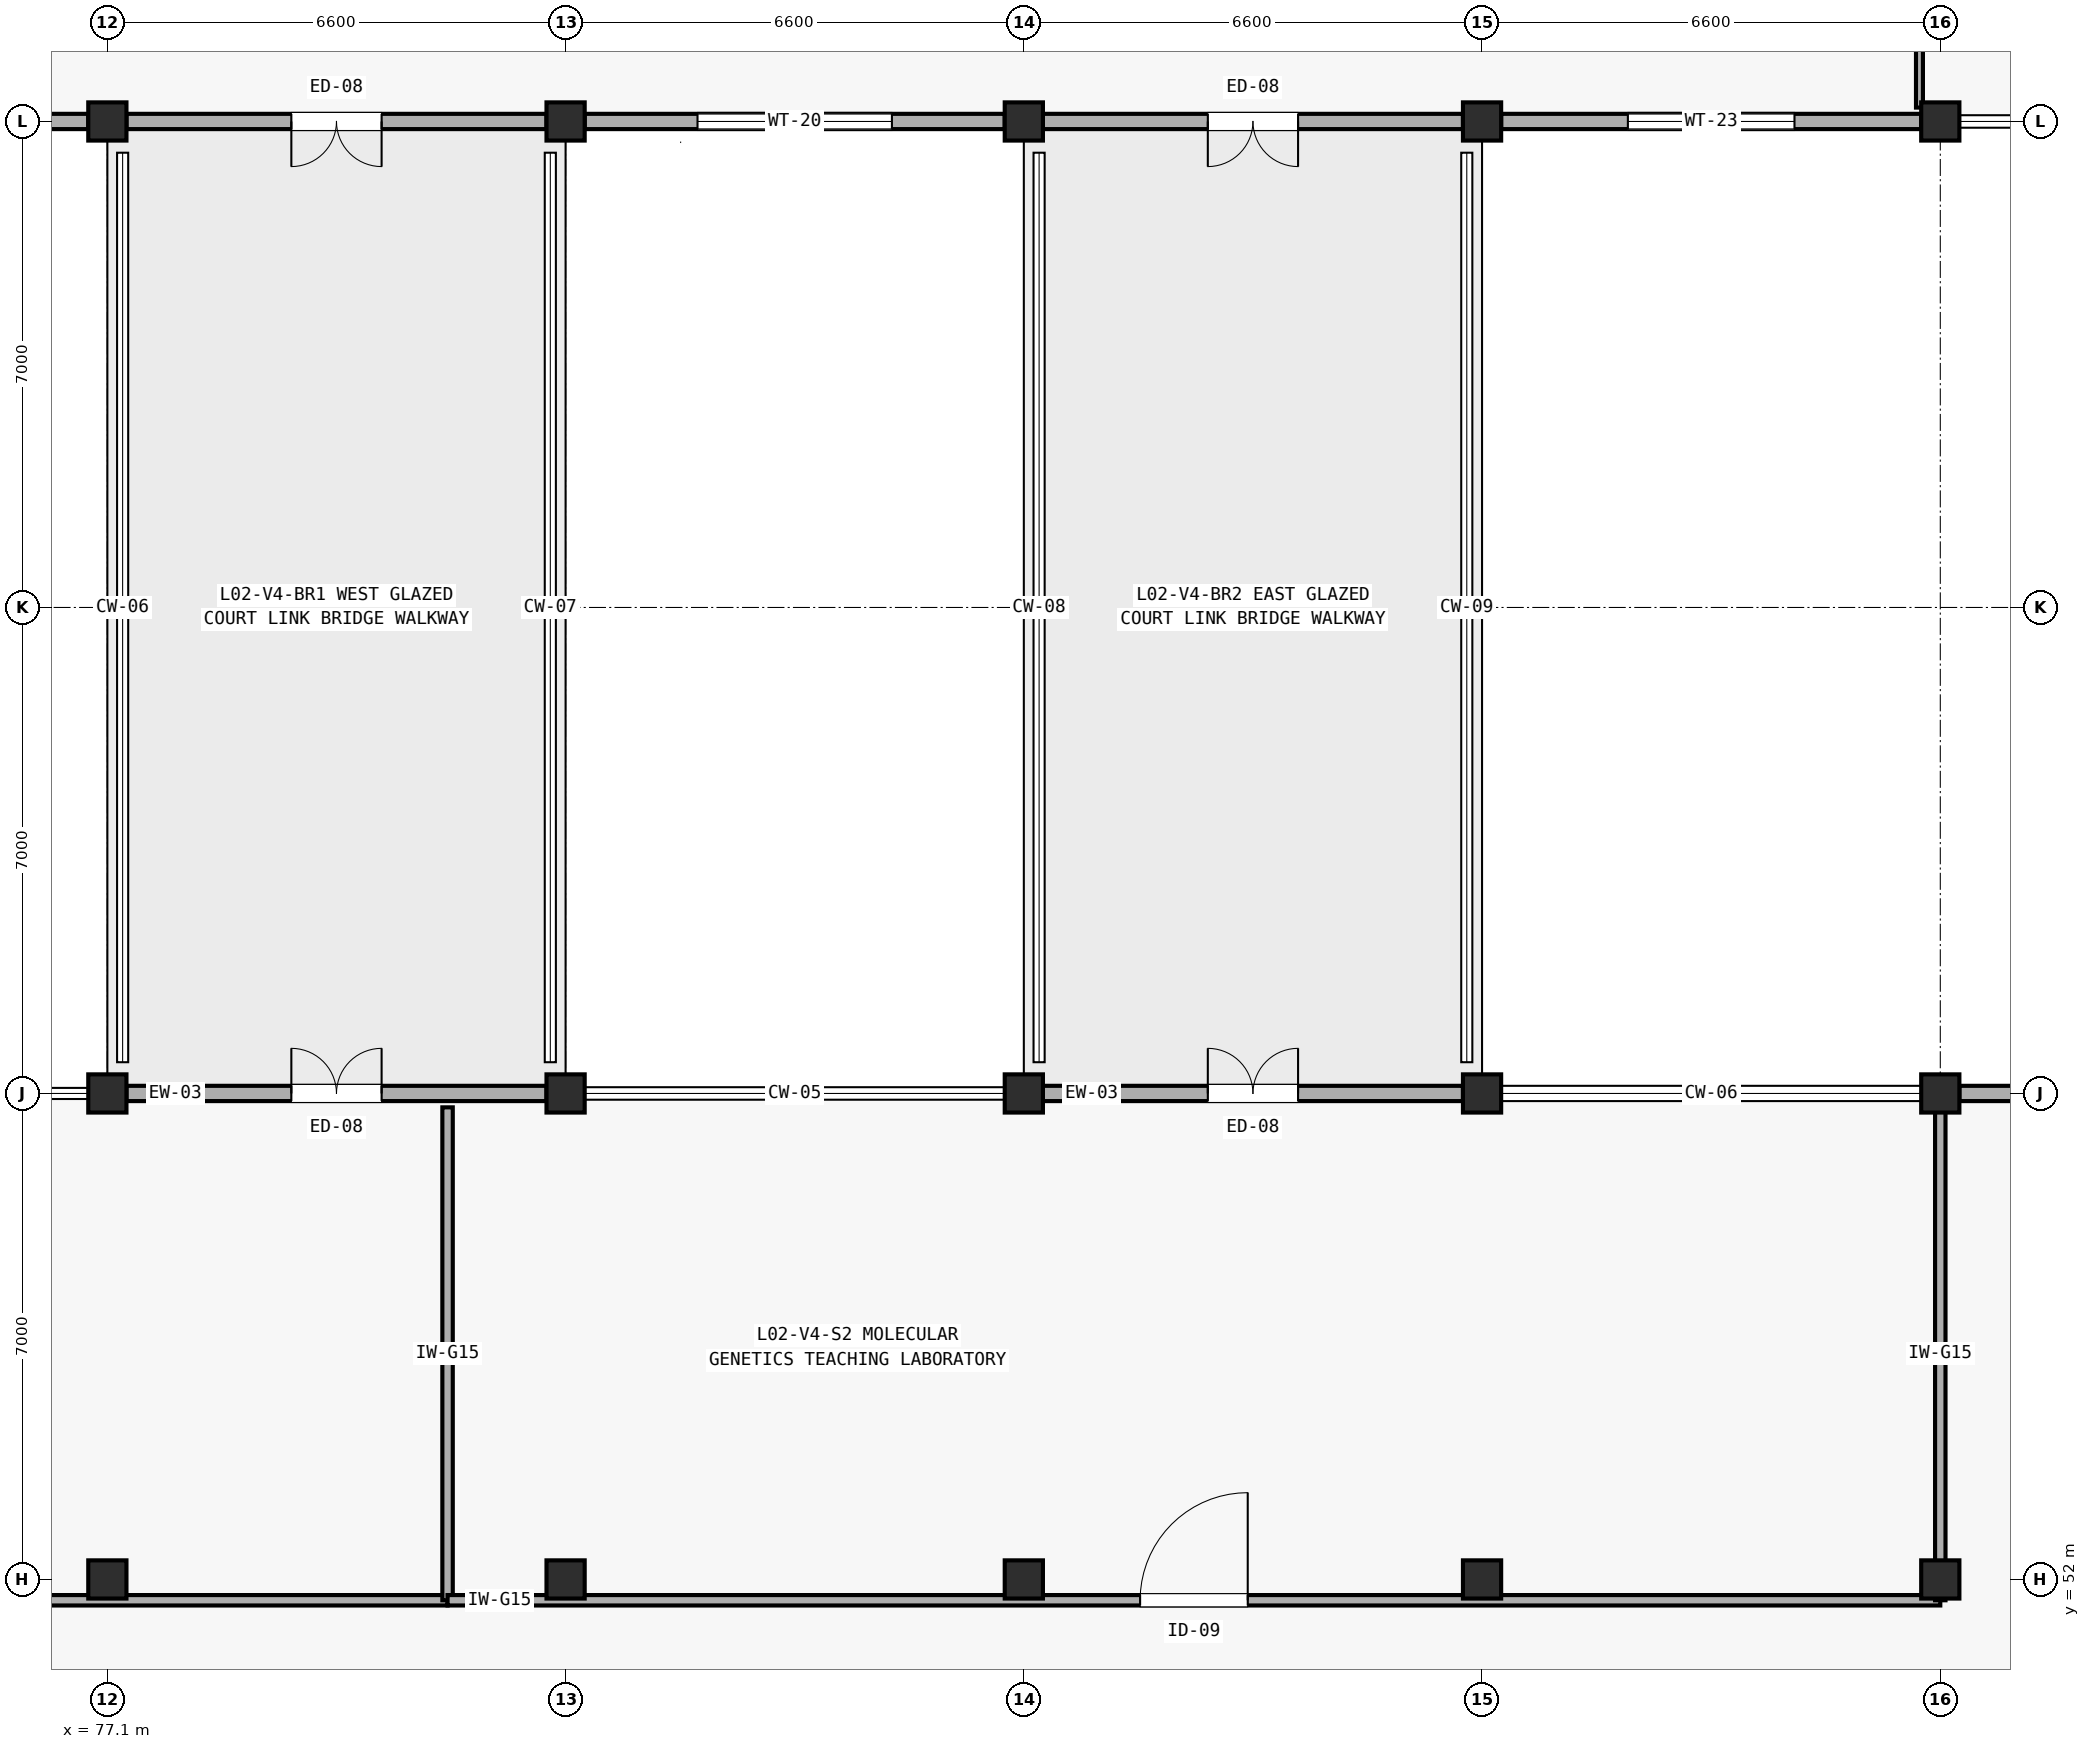
"""IFC4 building model, lengths in metres.
Left out: names, types, materials, properties, quantities, classifications, styles, units other than length and angle.
Written with IfcOpenShell. Run it as: python <this file> out.ifc"""

import sys

from ifc_helpers import new_model, si_unit, direction, frame, frame_2d, origin, origin_2d, place, context, subcontext, project, spatial, rectangle, extrude, element, fill, save


model = new_model("IFC4")
c1 = context("Model", 3, precision=1e-05, world=origin(), true_north=direction((0.0, 1.0)))
c2 = subcontext(c1, "Body", "Model", "MODEL_VIEW")
j1 = project(units=[si_unit("LENGTHUNIT", "METRE"), si_unit("PLANEANGLEUNIT", "RADIAN")], contexts=[c1])
p1 = place(None, origin())
s1 = spatial("IfcSite", under=j1, at=p1, CompositionType="ELEMENT")
p2 = place(p1, origin())
s2 = spatial("IfcBuilding", under=s1, at=p2, CompositionType="ELEMENT")
p3 = place(p2, frame((0.0, 0.0, 8.4)))
s3 = spatial("IfcBuildingStorey", under=s2, at=p3, CompositionType="ELEMENT", Elevation=8.4)
for number, where, z_axis, x_axis in (
    (1, (77.1, 52.0, 0.0), (0.0, 0.0, 1.0), (1.0, 0.0, 0.0)),
    (2, (77.1, 59.0, 0.0), (0.0, 0.0, 1.0), (1.0, 0.0, 0.0)),
    (3, (77.1, 73.0, 0.0), (0.0, 0.0, 1.0), (1.0, 0.0, 0.0)),
    (4, (83.7, 52.0, 0.0), (0.0, 0.0, 1.0), (1.0, 0.0, 0.0)),
    (5, (83.7, 59.0, 0.0), (0.0, 0.0, 1.0), (1.0, 0.0, 0.0)),
    (6, (83.7, 73.0, 0.0), (0.0, 0.0, 1.0), (1.0, 0.0, 0.0)),
    (7, (90.3, 52.0, 0.0), (0.0, 0.0, 1.0), (1.0, 0.0, 0.0)),
    (8, (90.3, 59.0, 0.0), (0.0, 0.0, 1.0), (1.0, 0.0, 0.0)),
    (9, (90.3, 73.0, 0.0), (0.0, 0.0, 1.0), (1.0, 0.0, 0.0)),
    (10, (96.9, 52.0, 0.0), (0.0, 0.0, 1.0), (1.0, 0.0, 0.0)),
    (11, (96.9, 59.0, 0.0), (0.0, 0.0, 1.0), (1.0, 0.0, 0.0)),
    (12, (96.9, 73.0, 0.0), (0.0, 0.0, 1.0), (1.0, 0.0, 0.0)),
    (13, (103.5, 52.0, 0.0), (0.0, 0.0, 1.0), (1.0, 0.0, 0.0)),
    (14, (103.5, 59.0, 0.0), (0.0, 0.0, 1.0), (1.0, 0.0, 0.0)),
    (15, (103.5, 73.0, 0.0), (0.0, 0.0, 1.0), (1.0, 0.0, 0.0)),
):
    element("IfcColumn", number, at=place(p3, frame(where, z_axis=z_axis, x_axis=x_axis)), inside=s3, PredefinedType="COLUMN", context=c2, shape_type="SweptSolid", body=[
        extrude(rectangle(XDim=0.55, YDim=0.55, at=origin_2d()), origin(), (0.0, 0.0, 1.0), 4.2),
    ])
p4 = place(p3, frame((77.375, 59.0, 0.0), z_axis=(0.0, 0.0, 1.0), x_axis=(1.0, 0.0, 0.0)))
e16 = element("IfcWall", 16, at=p4, inside=s3, PredefinedType="SOLIDWALL", context=c2, shape_type="SweptSolid", body=[
    extrude(rectangle(XDim=6.05, YDim=0.22, at=frame_2d((3.025, 0.0))), origin(), (0.0, 0.0, 1.0), 3.285),
])
p5 = place(p4, frame((2.375, 0.0, 0.0)))
e17 = element("IfcOpeningElement", 17, at=p5, cuts=e16, PredefinedType="OPENING", context=c2, shape_type="SweptSolid", body=[
    extrude(rectangle(XDim=1.3, YDim=2.15, at=frame_2d((0.65, 1.075))), frame((0.0, 0.12, 0.0), z_axis=(0.0, -1.0, 0.0), x_axis=(1.0, 0.0, 0.0)), (0.0, 0.0, 1.0), 0.24),
])
p6 = place(p3, frame((90.575, 59.0, 0.0), z_axis=(0.0, 0.0, 1.0), x_axis=(1.0, 0.0, 0.0)))
e18 = element("IfcWall", 18, at=p6, inside=s3, PredefinedType="SOLIDWALL", context=c2, shape_type="SweptSolid", body=[
    extrude(rectangle(XDim=6.05, YDim=0.22, at=frame_2d((3.025, 0.0))), origin(), (0.0, 0.0, 1.0), 3.365),
])
p7 = place(p6, frame((2.375, 0.0, 0.0)))
e19 = element("IfcOpeningElement", 19, at=p7, cuts=e18, PredefinedType="OPENING", context=c2, shape_type="SweptSolid", body=[
    extrude(rectangle(XDim=1.3, YDim=2.15, at=frame_2d((0.65, 1.075))), frame((0.0, 0.12, 0.0), z_axis=(0.0, -1.0, 0.0), x_axis=(1.0, 0.0, 0.0)), (0.0, 0.0, 1.0), 0.24),
])
p8 = place(p3, frame((103.775, 59.0, 0.0), z_axis=(0.0, 0.0, 1.0), x_axis=(1.0, 0.0, 0.0)))
e20 = element("IfcWall", 20, at=p8, inside=s3, PredefinedType="SOLIDWALL", context=c2, shape_type="SweptSolid", body=[
    extrude(rectangle(XDim=6.05, YDim=0.22, at=frame_2d((3.025, 0.0))), origin(), (0.0, 0.0, 1.0), 3.345),
])
p9 = place(p8, frame((1.525, 0.0, 0.85)))
e21 = element("IfcOpeningElement", 21, at=p9, cuts=e20, PredefinedType="OPENING", context=c2, shape_type="SweptSolid", body=[
    extrude(rectangle(XDim=3.0, YDim=1.5, at=frame_2d((1.5, 0.75))), frame((0.0, 0.12, 0.0), z_axis=(0.0, -1.0, 0.0), x_axis=(1.0, 0.0, 0.0)), (0.0, 0.0, 1.0), 0.24),
])
p10 = place(p3, frame((70.775, 73.0, 0.0), z_axis=(0.0, 0.0, 1.0), x_axis=(1.0, 0.0, 0.0)))
e22 = element("IfcWall", 22, at=p10, inside=s3, PredefinedType="SOLIDWALL", context=c2, shape_type="SweptSolid", body=[
    extrude(rectangle(XDim=6.05, YDim=0.22, at=frame_2d((3.025, 0.0))), origin(), (0.0, 0.0, 1.0), 3.235),
])
p11 = place(p10, frame((2.075, 0.0, 0.85)))
e23 = element("IfcOpeningElement", 23, at=p11, cuts=e22, PredefinedType="OPENING", context=c2, shape_type="SweptSolid", body=[
    extrude(rectangle(XDim=1.9, YDim=1.25, at=frame_2d((0.95, 0.625))), frame((0.0, 0.12, 0.0), z_axis=(0.0, -1.0, 0.0), x_axis=(1.0, 0.0, 0.0)), (0.0, 0.0, 1.0), 0.24),
])
p12 = place(p3, frame((77.375, 73.0, 0.0), z_axis=(0.0, 0.0, 1.0), x_axis=(1.0, 0.0, 0.0)))
e24 = element("IfcWall", 24, at=p12, inside=s3, PredefinedType="SOLIDWALL", context=c2, shape_type="SweptSolid", body=[
    extrude(rectangle(XDim=6.05, YDim=0.22, at=frame_2d((3.025, 0.0))), origin(), (0.0, 0.0, 1.0), 3.285),
])
p13 = place(p12, frame((2.375, 0.0, 0.0)))
e25 = element("IfcOpeningElement", 25, at=p13, cuts=e24, PredefinedType="OPENING", context=c2, shape_type="SweptSolid", body=[
    extrude(rectangle(XDim=1.3, YDim=2.15, at=frame_2d((0.65, 1.075))), frame((0.0, 0.12, 0.0), z_axis=(0.0, -1.0, 0.0), x_axis=(1.0, 0.0, 0.0)), (0.0, 0.0, 1.0), 0.24),
])
p14 = place(p3, frame((83.975, 73.0, 0.0), z_axis=(0.0, 0.0, 1.0), x_axis=(1.0, 0.0, 0.0)))
e26 = element("IfcWall", 26, at=p14, inside=s3, PredefinedType="SOLIDWALL", context=c2, shape_type="SweptSolid", body=[
    extrude(rectangle(XDim=6.05, YDim=0.22, at=frame_2d((3.025, 0.0))), origin(), (0.0, 0.0, 1.0), 3.365),
])
p15 = place(p14, frame((1.625, 0.0, 0.85)))
e27 = element("IfcOpeningElement", 27, at=p15, cuts=e26, PredefinedType="OPENING", context=c2, shape_type="SweptSolid", body=[
    extrude(rectangle(XDim=2.8, YDim=1.25, at=frame_2d((1.4, 0.625))), frame((0.0, 0.12, 0.0), z_axis=(0.0, -1.0, 0.0), x_axis=(1.0, 0.0, 0.0)), (0.0, 0.0, 1.0), 0.24),
])
p16 = place(p3, frame((90.575, 73.0, 0.0), z_axis=(0.0, 0.0, 1.0), x_axis=(1.0, 0.0, 0.0)))
e28 = element("IfcWall", 28, at=p16, inside=s3, PredefinedType="SOLIDWALL", context=c2, shape_type="SweptSolid", body=[
    extrude(rectangle(XDim=6.05, YDim=0.22, at=frame_2d((3.025, 0.0))), origin(), (0.0, 0.0, 1.0), 3.365),
])
p17 = place(p16, frame((2.375, 0.0, 0.0)))
e29 = element("IfcOpeningElement", 29, at=p17, cuts=e28, PredefinedType="OPENING", context=c2, shape_type="SweptSolid", body=[
    extrude(rectangle(XDim=1.3, YDim=2.15, at=frame_2d((0.65, 1.075))), frame((0.0, 0.12, 0.0), z_axis=(0.0, -1.0, 0.0), x_axis=(1.0, 0.0, 0.0)), (0.0, 0.0, 1.0), 0.24),
])
p18 = place(p3, frame((97.175, 73.0, 0.0), z_axis=(0.0, 0.0, 1.0), x_axis=(1.0, 0.0, 0.0)))
e30 = element("IfcWall", 30, at=p18, inside=s3, PredefinedType="SOLIDWALL", context=c2, shape_type="SweptSolid", body=[
    extrude(rectangle(XDim=6.05, YDim=0.22, at=frame_2d((3.025, 0.0))), origin(), (0.0, 0.0, 1.0), 3.385),
])
p19 = place(p18, frame((1.825, 0.0, 0.85)))
e31 = element("IfcOpeningElement", 31, at=p19, cuts=e30, PredefinedType="OPENING", context=c2, shape_type="SweptSolid", body=[
    extrude(rectangle(XDim=2.4, YDim=1.6, at=frame_2d((1.2, 0.8))), frame((0.0, 0.12, 0.0), z_axis=(0.0, -1.0, 0.0), x_axis=(1.0, 0.0, 0.0)), (0.0, 0.0, 1.0), 0.24),
])
p20 = place(p3, frame((63.6, 51.7, 0.0), z_axis=(0.0, 0.0, 1.0), x_axis=(1.0, 0.0, 0.0)))
e32 = element("IfcWall", 32, at=p20, inside=s3, PredefinedType="PARTITIONING", context=c2, shape_type="SweptSolid", body=[
    extrude(rectangle(XDim=18.4, YDim=0.15, at=frame_2d((9.2, 0.0))), origin(), (0.0, 0.0, 1.0), 3.235),
])
p21 = place(p20, frame((8.475, 0.0, 0.0)))
e33 = element("IfcOpeningElement", 33, at=p21, cuts=e32, PredefinedType="OPENING", context=c2, shape_type="SweptSolid", body=[
    extrude(rectangle(XDim=1.45, YDim=2.2, at=frame_2d((0.725, 1.1))), frame((0.0, 0.085, 0.0), z_axis=(0.0, -1.0, 0.0), x_axis=(1.0, 0.0, 0.0)), (0.0, 0.0, 1.0), 0.17),
])
p22 = place(p3, frame((82.0, 51.7, 0.0), z_axis=(0.0, 0.0, 1.0), x_axis=(0.0, 1.0, 0.0)))
e34 = element("IfcWall", 34, at=p22, inside=s3, PredefinedType="PARTITIONING", context=c2, shape_type="SweptSolid", body=[
    extrude(rectangle(XDim=7.1, YDim=0.15, at=frame_2d((3.55, 0.0))), origin(), (0.0, 0.0, 1.0), 3.501),
])
p23 = place(p3, frame((82.0, 51.7, 0.0), z_axis=(0.0, 0.0, 1.0), x_axis=(1.0, 0.0, 0.0)))
e35 = element("IfcWall", 35, at=p23, inside=s3, PredefinedType="PARTITIONING", context=c2, shape_type="SweptSolid", body=[
    extrude(rectangle(XDim=21.5, YDim=0.15, at=frame_2d((10.75, 0.0))), origin(), (0.0, 0.0, 1.0), 3.285),
])
p24 = place(p23, frame((9.975, 0.0, 0.0)))
e36 = element("IfcOpeningElement", 36, at=p24, cuts=e35, PredefinedType="OPENING", context=c2, shape_type="SweptSolid", body=[
    extrude(rectangle(XDim=1.55, YDim=2.2, at=frame_2d((0.775, 1.1))), frame((0.0, 0.085, 0.0), z_axis=(0.0, -1.0, 0.0), x_axis=(1.0, 0.0, 0.0)), (0.0, 0.0, 1.0), 0.17),
])
p25 = place(p3, frame((103.5, 51.7, 0.0), z_axis=(0.0, 0.0, 1.0), x_axis=(0.0, 1.0, 0.0)))
e37 = element("IfcWall", 37, at=p25, inside=s3, PredefinedType="PARTITIONING", context=c2, shape_type="SweptSolid", body=[
    extrude(rectangle(XDim=7.1, YDim=0.15, at=frame_2d((3.55, 0.0))), origin(), (0.0, 0.0, 1.0), 3.445),
])
p26 = place(p3, frame((103.2, 73.2, 0.0), z_axis=(0.0, 0.0, 1.0), x_axis=(0.0, 1.0, 0.0)))
e38 = element("IfcWall", 38, at=p26, inside=s3, PredefinedType="PARTITIONING", context=c2, shape_type="SweptSolid", body=[
    extrude(rectangle(XDim=4.1, YDim=0.1, at=frame_2d((2.05, 0.0))), origin(), (0.0, 0.0, 1.0), 3.545),
])
p27 = place(p5, origin())
e39 = element("IfcDoor", 39, at=p27, inside=s3, OperationType="DOUBLE_DOOR_SINGLE_SWING", PredefinedType="DOOR", context=c2, shape_type="SweptSolid", body=[
    extrude(rectangle(XDim=1.3, YDim=2.15, at=frame_2d((0.65, 1.075))), frame((0.0, 0.025, 0.0), z_axis=(0.0, -1.0, 0.0), x_axis=(1.0, 0.0, 0.0)), (0.0, 0.0, 1.0), 0.05),
])
fill(e17, e39)
p28 = place(p7, origin())
e40 = element("IfcDoor", 40, at=p28, inside=s3, OperationType="DOUBLE_DOOR_SINGLE_SWING", PredefinedType="DOOR", context=c2, shape_type="SweptSolid", body=[
    extrude(rectangle(XDim=1.3, YDim=2.15, at=frame_2d((0.65, 1.075))), frame((0.0, 0.025, 0.0), z_axis=(0.0, -1.0, 0.0), x_axis=(1.0, 0.0, 0.0)), (0.0, 0.0, 1.0), 0.05),
])
fill(e19, e40)
p29 = place(p13, frame((1.3, 0.0, 0.0), z_axis=(0.0, 0.0, 1.0), x_axis=(-1.0, 0.0, 0.0)))
e41 = element("IfcDoor", 41, at=p29, inside=s3, OperationType="DOUBLE_DOOR_SINGLE_SWING", PredefinedType="DOOR", context=c2, shape_type="SweptSolid", body=[
    extrude(rectangle(XDim=1.3, YDim=2.15, at=frame_2d((0.65, 1.075))), frame((0.0, 0.025, 0.0), z_axis=(0.0, -1.0, 0.0), x_axis=(1.0, 0.0, 0.0)), (0.0, 0.0, 1.0), 0.05),
])
fill(e25, e41)
p30 = place(p15, origin())
e42 = element("IfcWindow", 42, at=p30, inside=s3, PartitioningType="SINGLE_PANEL", PredefinedType="WINDOW", context=c2, shape_type="SweptSolid", body=[
    extrude(rectangle(XDim=2.8, YDim=1.25, at=frame_2d((1.4, 0.625))), frame((0.0, 0.03, 0.0), z_axis=(0.0, -1.0, 0.0), x_axis=(1.0, 0.0, 0.0)), (0.0, 0.0, 1.0), 0.06),
])
fill(e27, e42)
p31 = place(p17, frame((1.3, 0.0, 0.0), z_axis=(0.0, 0.0, 1.0), x_axis=(-1.0, 0.0, 0.0)))
e43 = element("IfcDoor", 43, at=p31, inside=s3, OperationType="DOUBLE_DOOR_SINGLE_SWING", PredefinedType="DOOR", context=c2, shape_type="SweptSolid", body=[
    extrude(rectangle(XDim=1.3, YDim=2.15, at=frame_2d((0.65, 1.075))), frame((0.0, 0.025, 0.0), z_axis=(0.0, -1.0, 0.0), x_axis=(1.0, 0.0, 0.0)), (0.0, 0.0, 1.0), 0.05),
])
fill(e29, e43)
p32 = place(p19, origin())
e44 = element("IfcWindow", 44, at=p32, inside=s3, PartitioningType="SINGLE_PANEL", PredefinedType="WINDOW", context=c2, shape_type="SweptSolid", body=[
    extrude(rectangle(XDim=2.4, YDim=1.6, at=frame_2d((1.2, 0.8))), frame((0.0, 0.03, 0.0), z_axis=(0.0, -1.0, 0.0), x_axis=(1.0, 0.0, 0.0)), (0.0, 0.0, 1.0), 0.06),
])
fill(e31, e44)
p33 = place(p24, origin())
e45 = element("IfcDoor", 45, at=p33, inside=s3, OperationType="SINGLE_SWING_RIGHT", PredefinedType="DOOR", context=c2, shape_type="SweptSolid", body=[
    extrude(rectangle(XDim=1.55, YDim=2.2, at=frame_2d((0.775, 1.1))), frame((0.0, 0.025, 0.0), z_axis=(0.0, -1.0, 0.0), x_axis=(1.0, 0.0, 0.0)), (0.0, 0.0, 1.0), 0.05),
])
fill(e36, e45)
save(model, sys.argv[1])
